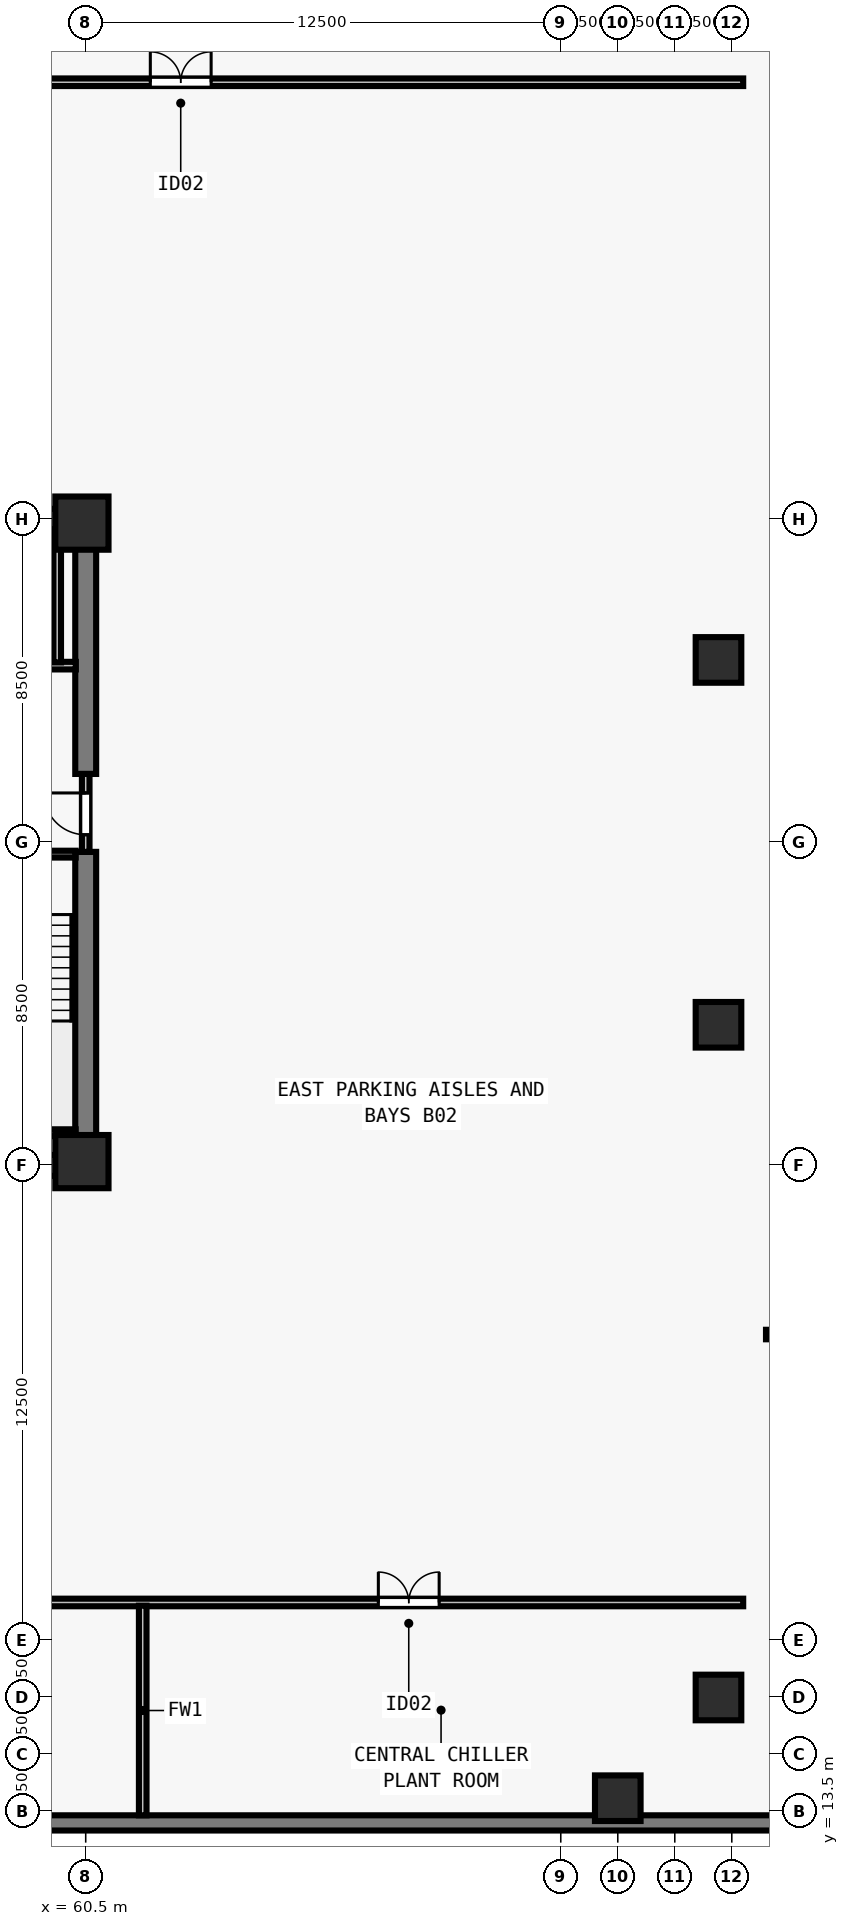
"""IFC4 building model, lengths in metres.
Left out: names, types, materials, properties, quantities, classifications, styles, units other than length and angle.
Written with IfcOpenShell. Run it as: python <this file> out.ifc"""

import sys

from ifc_helpers import new_model, si_unit, direction, frame, frame_2d, origin, origin_2d, place, context, subcontext, project, spatial, rectangle, extrude, element, fill, save


model = new_model("IFC4")
c1 = context("Model", 3, precision=1e-05, world=origin(), true_north=direction((0.0, 1.0)))
c2 = subcontext(c1, "Body", "Model", "MODEL_VIEW")
j1 = project(units=[si_unit("LENGTHUNIT", "METRE"), si_unit("PLANEANGLEUNIT", "RADIAN")], contexts=[c1])
p1 = place(None, origin())
s1 = spatial("IfcSite", under=j1, at=p1, CompositionType="ELEMENT")
p2 = place(p1, origin())
s2 = spatial("IfcBuilding", under=s1, at=p2, CompositionType="ELEMENT")
p3 = place(p2, frame((0.0, 0.0, -8.0)))
s3 = spatial("IfcBuildingStorey", under=s2, at=p3, CompositionType="ELEMENT", Elevation=-8.0)
for number, where, z_axis, x_axis in (
    (1, (60.4, 30.6, 0.0), (0.0, 0.0, 1.0), (1.0, 0.0, 0.0)),
    (2, (60.4, 47.4, 0.0), (0.0, 0.0, 1.0), (1.0, 0.0, 0.0)),
):
    element("IfcColumn", number, at=place(p3, frame(where, z_axis=z_axis, x_axis=x_axis)), inside=s3, PredefinedType="COLUMN", context=c2, shape_type="SweptSolid", body=[
        extrude(rectangle(XDim=1.4, YDim=1.4, at=origin_2d()), origin(), (0.0, 0.0, 1.0), 4.0),
    ])
for number, where, z_axis, x_axis in (
    (3, (74.5, 13.85, 0.0), (0.0, 0.0, 1.0), (1.0, 0.0, 0.0)),
    (4, (77.15, 16.5, 0.0), (0.0, 0.0, 1.0), (1.0, 0.0, 0.0)),
    (5, (77.15, 34.2, 0.0), (0.0, 0.0, 1.0), (1.0, 0.0, 0.0)),
    (6, (77.15, 43.8, 0.0), (0.0, 0.0, 1.0), (1.0, 0.0, 0.0)),
):
    element("IfcColumn", number, at=place(p3, frame(where, z_axis=z_axis, x_axis=x_axis)), inside=s3, PredefinedType="COLUMN", context=c2, shape_type="SweptSolid", body=[
        extrude(rectangle(XDim=1.2, YDim=1.2, at=origin_2d()), origin(), (0.0, 0.0, 1.0), 4.0),
    ])
p4 = place(p3, frame((85.0, 13.2, 0.0), z_axis=(0.0, 0.0, 1.0), x_axis=(-1.0, 0.0, 0.0)))
e7 = element("IfcWall", 7, at=p4, inside=s3, PredefinedType="USERDEFINED", context=c2, shape_type="SweptSolid", body=[
    extrude(rectangle(XDim=66.0, YDim=0.4, at=frame_2d((33.0, 0.0))), origin(), (0.0, 0.0, 1.0), 3.72),
])
for number, where, z_axis, x_axis in (
    (8, (43.225, 30.5, 0.0), (0.0, 0.0, 1.0), (1.0, 0.0, 0.0)),
    (9, (43.225, 47.5, 0.0), (0.0, 0.0, 1.0), (1.0, 0.0, 0.0)),
):
    element("IfcWall", number, at=place(p3, frame(where, z_axis=z_axis, x_axis=x_axis)), inside=s3, PredefinedType="SHEAR", context=c2, shape_type="SweptSolid", body=[
        extrude(rectangle(XDim=17.55, YDim=0.55, at=frame_2d((8.775, 0.0))), origin(), (0.0, 0.0, 1.0), 3.72),
    ])
p5 = place(p3, frame((60.5, 30.765, 0.0), z_axis=(0.0, 0.0, 1.0), x_axis=(0.0, 1.0, 0.0)))
e10 = element("IfcWall", 10, at=p5, inside=s3, PredefinedType="SHEAR", context=c2, shape_type="SweptSolid", body=[
    extrude(rectangle(XDim=7.985, YDim=0.55, at=frame_2d((3.993, 0.0))), origin(), (0.0, 0.0, 1.0), 3.72),
])
p6 = place(p3, frame((60.5, 40.8, 0.0), z_axis=(0.0, 0.0, 1.0), x_axis=(0.0, 1.0, 0.0)))
e11 = element("IfcWall", 11, at=p6, inside=s3, PredefinedType="SHEAR", context=c2, shape_type="SweptSolid", body=[
    extrude(rectangle(XDim=6.435, YDim=0.55, at=frame_2d((3.218, 0.0))), origin(), (0.0, 0.0, 1.0), 3.72),
])
p7 = place(p3, frame((60.5, 38.75, 0.0), z_axis=(0.0, 0.0, 1.0), x_axis=(0.0, 1.0, 0.0)))
e12 = element("IfcWall", 12, at=p7, inside=s3, PredefinedType="SOLIDWALL", context=c2, shape_type="SweptSolid", body=[
    extrude(rectangle(XDim=2.05, YDim=0.2, at=frame_2d((1.025, 0.0))), origin(), (0.0, 0.0, 1.0), 3.72),
])
p8 = place(p7, frame((0.45, 0.0, 0.0)))
e13 = element("IfcOpeningElement", 13, at=p8, cuts=e12, PredefinedType="OPENING", context=c2, shape_type="SweptSolid", body=[
    extrude(rectangle(XDim=1.1, YDim=2.15, at=frame_2d((0.55, 1.075))), frame((0.0, 0.11, 0.0), z_axis=(0.0, -1.0, 0.0), x_axis=(1.0, 0.0, 0.0)), (0.0, 0.0, 1.0), 0.22),
])
p9 = place(p3, frame((56.735, 43.65, 0.0), z_axis=(0.0, 0.0, 1.0), x_axis=(1.0, 0.0, 0.0)))
e14 = element("IfcWall", 14, at=p9, inside=s3, PredefinedType="SOLIDWALL", context=c2, shape_type="SweptSolid", body=[
    extrude(rectangle(XDim=3.505, YDim=0.2, at=frame_2d((1.752, 0.0))), origin(), (0.0, 0.0, 1.0), 3.72),
])
p10 = place(p9, frame((1.295, 0.0, 0.0)))
e15 = element("IfcOpeningElement", 15, at=p10, cuts=e14, PredefinedType="OPENING", context=c2, shape_type="SweptSolid", body=[
    extrude(rectangle(XDim=1.1, YDim=2.2, at=frame_2d((0.55, 1.1))), frame((0.0, 0.11, 0.0), z_axis=(0.0, -1.0, 0.0), x_axis=(1.0, 0.0, 0.0)), (0.0, 0.0, 1.0), 0.22),
])
p11 = place(p3, frame((59.75, 43.735, 0.0), z_axis=(0.0, 0.0, 1.0), x_axis=(0.0, 1.0, 0.0)))
e16 = element("IfcWall", 16, at=p11, inside=s3, PredefinedType="SOLIDWALL", context=c2, shape_type="SweptSolid", body=[
    extrude(rectangle(XDim=3.505, YDim=0.2, at=frame_2d((1.752, 0.0))), origin(), (0.0, 0.0, 1.0), 3.72),
])
p12 = place(p3, frame((26.2, 19.0, 0.0), z_axis=(0.0, 0.0, 1.0), x_axis=(1.0, 0.0, 0.0)))
e17 = element("IfcWall", 17, at=p12, inside=s3, PredefinedType="SOLIDWALL", context=c2, shape_type="SweptSolid", body=[
    extrude(rectangle(XDim=51.6, YDim=0.2, at=frame_2d((25.8, 0.0))), origin(), (0.0, 0.0, 1.0), 3.238),
])
p13 = place(p12, frame((8.0, 0.0, 0.0)))
e18 = element("IfcOpeningElement", 18, at=p13, cuts=e17, PredefinedType="OPENING", context=c2, shape_type="SweptSolid", body=[
    extrude(rectangle(XDim=1.6, YDim=2.2, at=frame_2d((0.8, 1.1))), frame((0.0, 0.11, 0.0), z_axis=(0.0, -1.0, 0.0), x_axis=(1.0, 0.0, 0.0)), (0.0, 0.0, 1.0), 0.22),
])
p14 = place(p12, frame((26.0, 0.0, 0.0)))
e19 = element("IfcOpeningElement", 19, at=p14, cuts=e17, PredefinedType="OPENING", context=c2, shape_type="SweptSolid", body=[
    extrude(rectangle(XDim=1.6, YDim=2.2, at=frame_2d((0.8, 1.1))), frame((0.0, 0.11, 0.0), z_axis=(0.0, -1.0, 0.0), x_axis=(1.0, 0.0, 0.0)), (0.0, 0.0, 1.0), 0.22),
])
p15 = place(p12, frame((42.0, 0.0, 0.0)))
e20 = element("IfcOpeningElement", 20, at=p15, cuts=e17, PredefinedType="OPENING", context=c2, shape_type="SweptSolid", body=[
    extrude(rectangle(XDim=1.6, YDim=2.2, at=frame_2d((0.8, 1.1))), frame((0.0, 0.11, 0.0), z_axis=(0.0, -1.0, 0.0), x_axis=(1.0, 0.0, 0.0)), (0.0, 0.0, 1.0), 0.22),
])
p16 = place(p3, frame((26.2, 59.0, 0.0), z_axis=(0.0, 0.0, 1.0), x_axis=(1.0, 0.0, 0.0)))
e21 = element("IfcWall", 21, at=p16, inside=s3, PredefinedType="SOLIDWALL", context=c2, shape_type="SweptSolid", body=[
    extrude(rectangle(XDim=51.6, YDim=0.2, at=frame_2d((25.8, 0.0))), origin(), (0.0, 0.0, 1.0), 3.238),
])
p17 = place(p16, frame((10.0, 0.0, 0.0)))
e22 = element("IfcOpeningElement", 22, at=p17, cuts=e21, PredefinedType="OPENING", context=c2, shape_type="SweptSolid", body=[
    extrude(rectangle(XDim=1.6, YDim=2.2, at=frame_2d((0.8, 1.1))), frame((0.0, 0.11, 0.0), z_axis=(0.0, -1.0, 0.0), x_axis=(1.0, 0.0, 0.0)), (0.0, 0.0, 1.0), 0.22),
])
p18 = place(p16, frame((36.0, 0.0, 0.0)))
e23 = element("IfcOpeningElement", 23, at=p18, cuts=e21, PredefinedType="OPENING", context=c2, shape_type="SweptSolid", body=[
    extrude(rectangle(XDim=1.6, YDim=2.2, at=frame_2d((0.8, 1.1))), frame((0.0, 0.11, 0.0), z_axis=(0.0, -1.0, 0.0), x_axis=(1.0, 0.0, 0.0)), (0.0, 0.0, 1.0), 0.22),
])
p19 = place(p3, frame((62.0, 13.4, 0.0), z_axis=(0.0, 0.0, 1.0), x_axis=(0.0, 1.0, 0.0)))
e24 = element("IfcWall", 24, at=p19, inside=s3, PredefinedType="SOLIDWALL", context=c2, shape_type="SweptSolid", body=[
    extrude(rectangle(XDim=5.515, YDim=0.2, at=frame_2d((2.758, 0.0))), origin(), (0.0, 0.0, 1.0), 3.72),
])
p20 = place(p3, frame((57.005, 38.69, 0.0), z_axis=(0.0, 0.0, 1.0), x_axis=(1.0, 0.0, 0.0)))
e25 = element("IfcWall", 25, at=p20, inside=s3, PredefinedType="SOLIDWALL", context=c2, shape_type="SweptSolid", body=[
    extrude(rectangle(XDim=3.23, YDim=0.18, at=frame_2d((1.615, 0.0))), origin(), (0.0, 0.0, 1.0), 3.72),
])
p21 = place(p20, frame((1.14, 0.0, 0.0)))
e26 = element("IfcOpeningElement", 26, at=p21, cuts=e25, PredefinedType="OPENING", context=c2, shape_type="SweptSolid", body=[
    extrude(rectangle(XDim=0.95, YDim=2.15, at=frame_2d((0.475, 1.075))), frame((0.0, 0.1, 0.0), z_axis=(0.0, -1.0, 0.0), x_axis=(1.0, 0.0, 0.0)), (0.0, 0.0, 1.0), 0.2),
])
p22 = place(p3, frame((57.005, 31.36, 0.0), z_axis=(0.0, 0.0, 1.0), x_axis=(1.0, 0.0, 0.0)))
e27 = element("IfcWall", 27, at=p22, inside=s3, PredefinedType="SOLIDWALL", context=c2, shape_type="SweptSolid", body=[
    extrude(rectangle(XDim=3.23, YDim=0.18, at=frame_2d((1.615, 0.0))), origin(), (0.0, 0.0, 1.0), 3.72),
])
p23 = place(p3, frame((78.4, 26.05, 0.0), z_axis=(0.0, 0.0, 1.0), x_axis=(1.0, 0.0, 0.0)))
e28 = element("IfcWall", 28, at=p23, inside=s3, PredefinedType="SOLIDWALL", context=c2, shape_type="SweptSolid", body=[
    extrude(rectangle(XDim=6.18, YDim=0.25, at=frame_2d((3.09, 0.0))), origin(), (0.0, 0.0, 1.0), 3.72),
])
p24 = place(p8, origin())
e29 = element("IfcDoor", 29, at=p24, inside=s3, OperationType="SINGLE_SWING_RIGHT", PredefinedType="DOOR", context=c2, shape_type="SweptSolid", body=[
    extrude(rectangle(XDim=1.1, YDim=2.15, at=frame_2d((0.55, 1.075))), frame((0.0, 0.025, 0.0), z_axis=(0.0, -1.0, 0.0), x_axis=(1.0, 0.0, 0.0)), (0.0, 0.0, 1.0), 0.05),
])
fill(e13, e29)
p25 = place(p15, origin())
e30 = element("IfcDoor", 30, at=p25, inside=s3, OperationType="DOUBLE_DOOR_SINGLE_SWING", PredefinedType="DOOR", context=c2, shape_type="SweptSolid", body=[
    extrude(rectangle(XDim=1.6, YDim=2.2, at=frame_2d((0.8, 1.1))), frame((0.0, 0.025, 0.0), z_axis=(0.0, -1.0, 0.0), x_axis=(1.0, 0.0, 0.0)), (0.0, 0.0, 1.0), 0.05),
])
fill(e20, e30)
p26 = place(p18, origin())
e31 = element("IfcDoor", 31, at=p26, inside=s3, OperationType="DOUBLE_DOOR_SINGLE_SWING", PredefinedType="DOOR", context=c2, shape_type="SweptSolid", body=[
    extrude(rectangle(XDim=1.6, YDim=2.2, at=frame_2d((0.8, 1.1))), frame((0.0, 0.025, 0.0), z_axis=(0.0, -1.0, 0.0), x_axis=(1.0, 0.0, 0.0)), (0.0, 0.0, 1.0), 0.05),
])
fill(e23, e31)
save(model, sys.argv[1])
